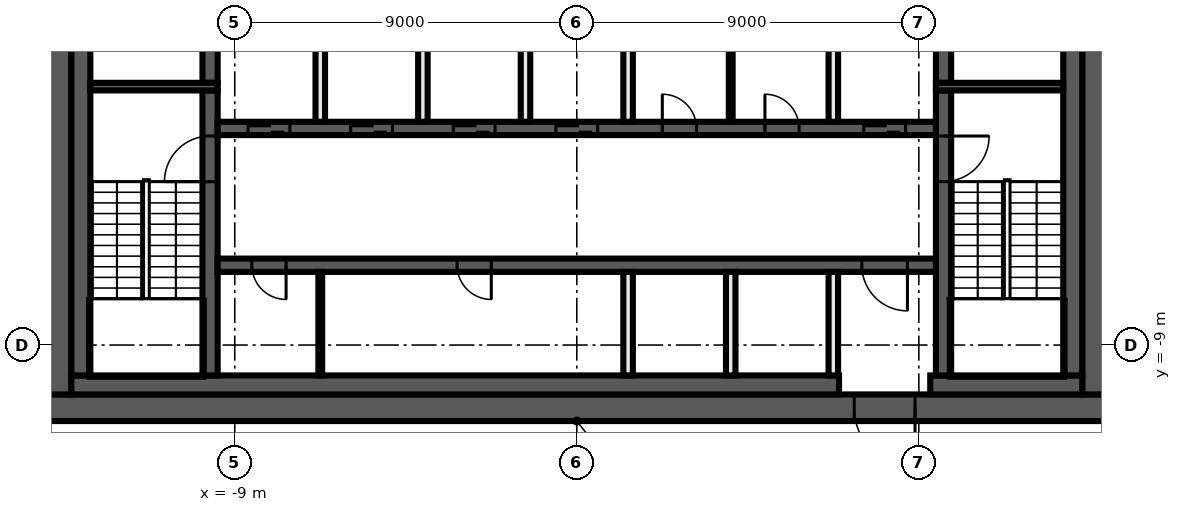
"""IFC4 building model, lengths in metres.
Left out: names, types, materials, properties, quantities, classifications, styles, units other than length and angle.
Written with IfcOpenShell. Run it as: python <this file> out.ifc"""

import sys

from ifc_helpers import new_model, si_unit, direction, frame, frame_2d, origin, place, context, subcontext, project, spatial, rectangle, extrude, element, fill, save


model = new_model("IFC4")
c1 = context("Model", 3, precision=1e-05, world=origin(), true_north=direction((0.0, 1.0)))
c2 = subcontext(c1, "Body", "Model", "MODEL_VIEW")
j1 = project(units=[si_unit("LENGTHUNIT", "METRE"), si_unit("PLANEANGLEUNIT", "RADIAN")], contexts=[c1])
p1 = place(None, origin())
s1 = spatial("IfcSite", under=j1, at=p1, CompositionType="ELEMENT")
p2 = place(p1, origin())
s2 = spatial("IfcBuilding", under=s1, at=p2, CompositionType="ELEMENT")
p3 = place(p2, frame((0.0, 0.0, 258.0)))
s3 = spatial("IfcBuildingStorey", under=s2, at=p3, CompositionType="ELEMENT", Elevation=258.0)
p4 = place(p3, frame((14.0, -10.65, 0.0), z_axis=(0.0, 0.0, 1.0), x_axis=(-1.0, 0.0, 0.0)))
e1 = element("IfcWall", 1, at=p4, inside=s3, PredefinedType="SHEAR", context=c2, shape_type="SweptSolid", body=[
    extrude(rectangle(XDim=28.0, YDim=0.7, at=frame_2d((14.0, 0.0))), origin(), (0.0, 0.0, 1.0), 3.82),
])
p5 = place(p4, frame((5.1, 0.0, 0.0)))
e2 = element("IfcOpeningElement", 2, at=p5, cuts=e1, PredefinedType="OPENING", context=c2, shape_type="SweptSolid", body=[
    extrude(rectangle(XDim=1.6, YDim=2.1, at=frame_2d((0.8, 1.05))), frame((0.0, 0.36, 0.0), z_axis=(0.0, -1.0, 0.0), x_axis=(1.0, 0.0, 0.0)), (0.0, 0.0, 1.0), 0.72),
])
for number, where, z_axis, x_axis in (
    (3, (13.65, 10.3, 0.0), (0.0, 0.0, 1.0), (0.0, -1.0, 0.0)),
    (4, (-13.65, -10.3, 0.0), (0.0, 0.0, 1.0), (0.0, 1.0, 0.0)),
):
    element("IfcWall", number, at=place(p3, frame(where, z_axis=z_axis, x_axis=x_axis)), inside=s3, PredefinedType="SHEAR", context=c2, shape_type="SweptSolid", body=[
        extrude(rectangle(XDim=20.6, YDim=0.7, at=frame_2d((10.3, 0.0))), origin(), (0.0, 0.0, 1.0), 3.82),
    ])
p6 = place(p3, frame((13.3, -10.05, 0.0), z_axis=(0.0, 0.0, 1.0), x_axis=(-1.0, 0.0, 0.0)))
e5 = element("IfcWall", 5, at=p6, inside=s3, PredefinedType="SHEAR", context=c2, shape_type="SweptSolid", body=[
    extrude(rectangle(XDim=4.0, YDim=0.5, at=frame_2d((2.0, 0.0))), origin(), (0.0, 0.0, 1.0), 3.82),
])
p7 = place(p3, frame((6.9, -10.05, 0.0), z_axis=(0.0, 0.0, 1.0), x_axis=(-1.0, 0.0, 0.0)))
e6 = element("IfcWall", 6, at=p7, inside=s3, PredefinedType="SHEAR", context=c2, shape_type="SweptSolid", body=[
    extrude(rectangle(XDim=20.2, YDim=0.5, at=frame_2d((10.1, 0.0))), origin(), (0.0, 0.0, 1.0), 3.82),
])
for number, where, z_axis, x_axis in (
    (7, (13.05, 9.8, 0.0), (0.0, 0.0, 1.0), (0.0, -1.0, 0.0)),
    (8, (-13.05, -9.8, 0.0), (0.0, 0.0, 1.0), (0.0, 1.0, 0.0)),
):
    element("IfcWall", number, at=place(p3, frame(where, z_axis=z_axis, x_axis=x_axis)), inside=s3, PredefinedType="SHEAR", context=c2, shape_type="SweptSolid", body=[
        extrude(rectangle(XDim=19.6, YDim=0.5, at=frame_2d((9.8, 0.0))), origin(), (0.0, 0.0, 1.0), 3.82),
    ])
p8 = place(p3, frame((9.65, -2.3, 0.0), z_axis=(0.0, 0.0, 1.0), x_axis=(0.0, -1.0, 0.0)))
e9 = element("IfcWall", 9, at=p8, inside=s3, PredefinedType="SHEAR", context=c2, shape_type="SweptSolid", body=[
    extrude(rectangle(XDim=7.5, YDim=0.4, at=frame_2d((3.75, 0.0))), origin(), (0.0, 0.0, 1.0), 3.82),
])
p9 = place(p8, frame((1.2, 0.0, 0.0)))
e10 = element("IfcOpeningElement", 10, at=p9, cuts=e9, PredefinedType="OPENING", context=c2, shape_type="SweptSolid", body=[
    extrude(rectangle(XDim=1.2, YDim=2.1, at=frame_2d((0.6, 1.05))), frame((0.0, 0.21, 0.0), z_axis=(0.0, -1.0, 0.0), x_axis=(1.0, 0.0, 0.0)), (0.0, 0.0, 1.0), 0.42),
])
p10 = place(p3, frame((9.65, 2.1, 0.0), z_axis=(0.0, 0.0, 1.0), x_axis=(0.0, -1.0, 0.0)))
e11 = element("IfcWall", 11, at=p10, inside=s3, PredefinedType="SHEAR", context=c2, shape_type="SweptSolid", body=[
    extrude(rectangle(XDim=4.2, YDim=0.4, at=frame_2d((2.1, 0.0))), origin(), (0.0, 0.0, 1.0), 3.82),
])
p11 = place(p10, frame((0.15, 0.0, 0.0)))
e12 = element("IfcOpeningElement", 12, at=p11, cuts=e11, PredefinedType="OPENING", context=c2, shape_type="SweptSolid", body=[
    extrude(rectangle(XDim=0.9, YDim=2.1, at=frame_2d((0.45, 1.05))), frame((0.0, 0.21, 0.0), z_axis=(0.0, -1.0, 0.0), x_axis=(1.0, 0.0, 0.0)), (0.0, 0.0, 1.0), 0.42),
])
p12 = place(p3, frame((-9.65, -9.8, 0.0), z_axis=(0.0, 0.0, 1.0), x_axis=(0.0, 1.0, 0.0)))
e13 = element("IfcWall", 13, at=p12, inside=s3, PredefinedType="SHEAR", context=c2, shape_type="SweptSolid", body=[
    extrude(rectangle(XDim=7.5, YDim=0.4, at=frame_2d((3.75, 0.0))), origin(), (0.0, 0.0, 1.0), 3.82),
])
p13 = place(p12, frame((5.1, 0.0, 0.0)))
e14 = element("IfcOpeningElement", 14, at=p13, cuts=e13, PredefinedType="OPENING", context=c2, shape_type="SweptSolid", body=[
    extrude(rectangle(XDim=1.2, YDim=2.1, at=frame_2d((0.6, 1.05))), frame((0.0, 0.21, 0.0), z_axis=(0.0, -1.0, 0.0), x_axis=(1.0, 0.0, 0.0)), (0.0, 0.0, 1.0), 0.42),
])
p14 = place(p3, frame((-9.65, -2.1, 0.0), z_axis=(0.0, 0.0, 1.0), x_axis=(0.0, 1.0, 0.0)))
e15 = element("IfcWall", 15, at=p14, inside=s3, PredefinedType="SHEAR", context=c2, shape_type="SweptSolid", body=[
    extrude(rectangle(XDim=4.2, YDim=0.4, at=frame_2d((2.1, 0.0))), origin(), (0.0, 0.0, 1.0), 3.82),
])
for number, where, z_axis, x_axis in (
    (16, (9.45, -2.2, 0.0), (0.0, 0.0, 1.0), (1.0, 0.0, 0.0)),
    (17, (-9.45, -2.2, 0.0), (0.0, 0.0, 1.0), (-1.0, 0.0, 0.0)),
):
    element("IfcWall", number, at=place(p3, frame(where, z_axis=z_axis, x_axis=x_axis)), inside=s3, PredefinedType="SHEAR", context=c2, shape_type="SweptSolid", body=[
        extrude(rectangle(XDim=3.35, YDim=0.2, at=frame_2d((1.675, 0.0))), origin(), (0.0, 0.0, 1.0), 3.82),
    ])
p15 = place(p3, frame((-9.45, -3.3, 0.0), z_axis=(0.0, 0.0, 1.0), x_axis=(1.0, 0.0, 0.0)))
e18 = element("IfcWall", 18, at=p15, inside=s3, PredefinedType="SHEAR", context=c2, shape_type="SweptSolid", body=[
    extrude(rectangle(XDim=18.9, YDim=0.35, at=frame_2d((9.45, 0.0))), origin(), (0.0, 0.0, 1.0), 3.82),
])
p16 = place(p15, frame((0.8, 0.0, 0.0)))
e19 = element("IfcOpeningElement", 19, at=p16, cuts=e18, PredefinedType="OPENING", context=c2, shape_type="SweptSolid", body=[
    extrude(rectangle(XDim=1.1, YDim=2.1, at=frame_2d((0.55, 1.05))), frame((0.0, 0.185, 0.0), z_axis=(0.0, -1.0, 0.0), x_axis=(1.0, 0.0, 0.0)), (0.0, 0.0, 1.0), 0.37),
])
p17 = place(p15, frame((3.5, 0.0, 0.0)))
e20 = element("IfcOpeningElement", 20, at=p17, cuts=e18, PredefinedType="OPENING", context=c2, shape_type="SweptSolid", body=[
    extrude(rectangle(XDim=1.1, YDim=2.1, at=frame_2d((0.55, 1.05))), frame((0.0, 0.185, 0.0), z_axis=(0.0, -1.0, 0.0), x_axis=(1.0, 0.0, 0.0)), (0.0, 0.0, 1.0), 0.37),
])
p18 = place(p15, frame((6.2, 0.0, 0.0)))
e21 = element("IfcOpeningElement", 21, at=p18, cuts=e18, PredefinedType="OPENING", context=c2, shape_type="SweptSolid", body=[
    extrude(rectangle(XDim=1.1, YDim=2.1, at=frame_2d((0.55, 1.05))), frame((0.0, 0.185, 0.0), z_axis=(0.0, -1.0, 0.0), x_axis=(1.0, 0.0, 0.0)), (0.0, 0.0, 1.0), 0.37),
])
p19 = place(p15, frame((8.9, 0.0, 0.0)))
e22 = element("IfcOpeningElement", 22, at=p19, cuts=e18, PredefinedType="OPENING", context=c2, shape_type="SweptSolid", body=[
    extrude(rectangle(XDim=1.1, YDim=2.1, at=frame_2d((0.55, 1.05))), frame((0.0, 0.185, 0.0), z_axis=(0.0, -1.0, 0.0), x_axis=(1.0, 0.0, 0.0)), (0.0, 0.0, 1.0), 0.37),
])
p20 = place(p15, frame((17.0, 0.0, 0.0)))
e23 = element("IfcOpeningElement", 23, at=p20, cuts=e18, PredefinedType="OPENING", context=c2, shape_type="SweptSolid", body=[
    extrude(rectangle(XDim=1.1, YDim=2.1, at=frame_2d((0.55, 1.05))), frame((0.0, 0.185, 0.0), z_axis=(0.0, -1.0, 0.0), x_axis=(1.0, 0.0, 0.0)), (0.0, 0.0, 1.0), 0.37),
])
p21 = place(p15, frame((11.7, 0.0, 0.0)))
e24 = element("IfcOpeningElement", 24, at=p21, cuts=e18, PredefinedType="OPENING", context=c2, shape_type="SweptSolid", body=[
    extrude(rectangle(XDim=0.9, YDim=2.1, at=frame_2d((0.45, 1.05))), frame((0.0, 0.185, 0.0), z_axis=(0.0, -1.0, 0.0), x_axis=(1.0, 0.0, 0.0)), (0.0, 0.0, 1.0), 0.37),
])
p22 = place(p15, frame((14.4, 0.0, 0.0)))
e25 = element("IfcOpeningElement", 25, at=p22, cuts=e18, PredefinedType="OPENING", context=c2, shape_type="SweptSolid", body=[
    extrude(rectangle(XDim=0.9, YDim=2.1, at=frame_2d((0.45, 1.05))), frame((0.0, 0.185, 0.0), z_axis=(0.0, -1.0, 0.0), x_axis=(1.0, 0.0, 0.0)), (0.0, 0.0, 1.0), 0.37),
])
p23 = place(p3, frame((9.45, -6.9, 0.0), z_axis=(0.0, 0.0, 1.0), x_axis=(-1.0, 0.0, 0.0)))
e26 = element("IfcWall", 26, at=p23, inside=s3, PredefinedType="SHEAR", context=c2, shape_type="SweptSolid", body=[
    extrude(rectangle(XDim=18.9, YDim=0.35, at=frame_2d((9.45, 0.0))), origin(), (0.0, 0.0, 1.0), 3.82),
])
p24 = place(p23, frame((0.75, 0.0, 0.0)))
e27 = element("IfcOpeningElement", 27, at=p24, cuts=e26, PredefinedType="OPENING", context=c2, shape_type="SweptSolid", body=[
    extrude(rectangle(XDim=1.2, YDim=2.1, at=frame_2d((0.6, 1.05))), frame((0.0, 0.185, 0.0), z_axis=(0.0, -1.0, 0.0), x_axis=(1.0, 0.0, 0.0)), (0.0, 0.0, 1.0), 0.37),
])
p25 = place(p23, frame((17.1, 0.0, 0.0)))
e28 = element("IfcOpeningElement", 28, at=p25, cuts=e26, PredefinedType="OPENING", context=c2, shape_type="SweptSolid", body=[
    extrude(rectangle(XDim=0.9, YDim=2.1, at=frame_2d((0.45, 1.05))), frame((0.0, 0.185, 0.0), z_axis=(0.0, -1.0, 0.0), x_axis=(1.0, 0.0, 0.0)), (0.0, 0.0, 1.0), 0.37),
])
p26 = place(p23, frame((11.7, 0.0, 0.0)))
e29 = element("IfcOpeningElement", 29, at=p26, cuts=e26, PredefinedType="OPENING", context=c2, shape_type="SweptSolid", body=[
    extrude(rectangle(XDim=0.9, YDim=2.1, at=frame_2d((0.45, 1.05))), frame((0.0, 0.185, 0.0), z_axis=(0.0, -1.0, 0.0), x_axis=(1.0, 0.0, 0.0)), (0.0, 0.0, 1.0), 0.37),
])
for number, where, z_axis, x_axis in (
    (30, (6.75, -9.8, 0.0), (0.0, 0.0, 1.0), (0.0, 1.0, 0.0)),
    (31, (6.75, -3.125, 0.0), (0.0, 0.0, 1.0), (0.0, 1.0, 0.0)),
):
    element("IfcWall", number, at=place(p3, frame(where, z_axis=z_axis, x_axis=x_axis)), inside=s3, PredefinedType="SOLIDWALL", context=c2, shape_type="SweptSolid", body=[
        extrude(rectangle(XDim=2.725, YDim=0.25, at=frame_2d((1.363, 0.0))), origin(), (0.0, 0.0, 1.0), 3.82),
    ])
p27 = place(p3, frame((4.05, -3.125, 0.0), z_axis=(0.0, 0.0, 1.0), x_axis=(0.0, 1.0, 0.0)))
e32 = element("IfcWall", 32, at=p27, inside=s3, PredefinedType="PARTITIONING", context=c2, shape_type="SweptSolid", body=[
    extrude(rectangle(XDim=2.725, YDim=0.1, at=frame_2d((1.363, 0.0))), origin(), (0.0, 0.0, 1.0), 3.82),
])
for number, where, z_axis, x_axis in (
    (33, (4.05, -9.8, 0.0), (0.0, 0.0, 1.0), (0.0, 1.0, 0.0)),
    (34, (1.35, -9.8, 0.0), (0.0, 0.0, 1.0), (0.0, 1.0, 0.0)),
    (35, (1.35, -3.125, 0.0), (0.0, 0.0, 1.0), (0.0, 1.0, 0.0)),
    (36, (-1.35, -3.125, 0.0), (0.0, 0.0, 1.0), (0.0, 1.0, 0.0)),
    (37, (-4.05, -3.125, 0.0), (0.0, 0.0, 1.0), (0.0, 1.0, 0.0)),
):
    element("IfcWall", number, at=place(p3, frame(where, z_axis=z_axis, x_axis=x_axis)), inside=s3, PredefinedType="SOLIDWALL", context=c2, shape_type="SweptSolid", body=[
        extrude(rectangle(XDim=2.725, YDim=0.25, at=frame_2d((1.363, 0.0))), origin(), (0.0, 0.0, 1.0), 3.82),
    ])
p28 = place(p3, frame((-6.75, -9.8, 0.0), z_axis=(0.0, 0.0, 1.0), x_axis=(0.0, 1.0, 0.0)))
e38 = element("IfcWall", 38, at=p28, inside=s3, PredefinedType="PARTITIONING", context=c2, shape_type="SweptSolid", body=[
    extrude(rectangle(XDim=2.725, YDim=0.1, at=frame_2d((1.363, 0.0))), origin(), (0.0, 0.0, 1.0), 3.82),
])
p29 = place(p3, frame((-6.75, -3.125, 0.0), z_axis=(0.0, 0.0, 1.0), x_axis=(0.0, 1.0, 0.0)))
e39 = element("IfcWall", 39, at=p29, inside=s3, PredefinedType="SOLIDWALL", context=c2, shape_type="SweptSolid", body=[
    extrude(rectangle(XDim=2.725, YDim=0.25, at=frame_2d((1.363, 0.0))), origin(), (0.0, 0.0, 1.0), 3.82),
])
p30 = place(p16, origin())
e40 = element("IfcDoor", 40, at=p30, inside=s3, OperationType="DOUBLE_DOOR_SLIDING", PredefinedType="DOOR", context=c2, shape_type="SweptSolid", body=[
    extrude(rectangle(XDim=1.1, YDim=2.1, at=frame_2d((0.55, 1.05))), frame((0.0, 0.025, 0.0), z_axis=(0.0, -1.0, 0.0), x_axis=(1.0, 0.0, 0.0)), (0.0, 0.0, 1.0), 0.05),
])
fill(e19, e40)
p31 = place(p17, origin())
e41 = element("IfcDoor", 41, at=p31, inside=s3, OperationType="DOUBLE_DOOR_SLIDING", PredefinedType="DOOR", context=c2, shape_type="SweptSolid", body=[
    extrude(rectangle(XDim=1.1, YDim=2.1, at=frame_2d((0.55, 1.05))), frame((0.0, 0.025, 0.0), z_axis=(0.0, -1.0, 0.0), x_axis=(1.0, 0.0, 0.0)), (0.0, 0.0, 1.0), 0.05),
])
fill(e20, e41)
p32 = place(p18, origin())
e42 = element("IfcDoor", 42, at=p32, inside=s3, OperationType="DOUBLE_DOOR_SLIDING", PredefinedType="DOOR", context=c2, shape_type="SweptSolid", body=[
    extrude(rectangle(XDim=1.1, YDim=2.1, at=frame_2d((0.55, 1.05))), frame((0.0, 0.025, 0.0), z_axis=(0.0, -1.0, 0.0), x_axis=(1.0, 0.0, 0.0)), (0.0, 0.0, 1.0), 0.05),
])
fill(e21, e42)
p33 = place(p19, origin())
e43 = element("IfcDoor", 43, at=p33, inside=s3, OperationType="DOUBLE_DOOR_SLIDING", PredefinedType="DOOR", context=c2, shape_type="SweptSolid", body=[
    extrude(rectangle(XDim=1.1, YDim=2.1, at=frame_2d((0.55, 1.05))), frame((0.0, 0.025, 0.0), z_axis=(0.0, -1.0, 0.0), x_axis=(1.0, 0.0, 0.0)), (0.0, 0.0, 1.0), 0.05),
])
fill(e22, e43)
p34 = place(p20, origin())
e44 = element("IfcDoor", 44, at=p34, inside=s3, OperationType="DOUBLE_DOOR_SLIDING", PredefinedType="DOOR", context=c2, shape_type="SweptSolid", body=[
    extrude(rectangle(XDim=1.1, YDim=2.1, at=frame_2d((0.55, 1.05))), frame((0.0, 0.025, 0.0), z_axis=(0.0, -1.0, 0.0), x_axis=(1.0, 0.0, 0.0)), (0.0, 0.0, 1.0), 0.05),
])
fill(e23, e44)
p35 = place(p5, origin())
e45 = element("IfcDoor", 45, at=p35, inside=s3, OperationType="DOUBLE_DOOR_SINGLE_SWING", PredefinedType="DOOR", context=c2, shape_type="SweptSolid", body=[
    extrude(rectangle(XDim=1.6, YDim=2.1, at=frame_2d((0.8, 1.05))), frame((0.0, 0.025, 0.0), z_axis=(0.0, -1.0, 0.0), x_axis=(1.0, 0.0, 0.0)), (0.0, 0.0, 1.0), 0.05),
])
fill(e2, e45)
p36 = place(p24, origin())
e46 = element("IfcDoor", 46, at=p36, inside=s3, OperationType="SINGLE_SWING_LEFT", PredefinedType="DOOR", context=c2, shape_type="SweptSolid", body=[
    extrude(rectangle(XDim=1.2, YDim=2.1, at=frame_2d((0.6, 1.05))), frame((0.0, 0.025, 0.0), z_axis=(0.0, -1.0, 0.0), x_axis=(1.0, 0.0, 0.0)), (0.0, 0.0, 1.0), 0.05),
])
fill(e27, e46)
p37 = place(p21, origin())
e47 = element("IfcDoor", 47, at=p37, inside=s3, OperationType="SINGLE_SWING_RIGHT", PredefinedType="DOOR", context=c2, shape_type="SweptSolid", body=[
    extrude(rectangle(XDim=0.9, YDim=2.1, at=frame_2d((0.45, 1.05))), frame((0.0, 0.025, 0.0), z_axis=(0.0, -1.0, 0.0), x_axis=(1.0, 0.0, 0.0)), (0.0, 0.0, 1.0), 0.05),
])
fill(e24, e47)
p38 = place(p22, origin())
e48 = element("IfcDoor", 48, at=p38, inside=s3, OperationType="SINGLE_SWING_LEFT", PredefinedType="DOOR", context=c2, shape_type="SweptSolid", body=[
    extrude(rectangle(XDim=0.9, YDim=2.1, at=frame_2d((0.45, 1.05))), frame((0.0, 0.025, 0.0), z_axis=(0.0, -1.0, 0.0), x_axis=(1.0, 0.0, 0.0)), (0.0, 0.0, 1.0), 0.05),
])
fill(e25, e48)
p39 = place(p25, origin())
e49 = element("IfcDoor", 49, at=p39, inside=s3, OperationType="SINGLE_SWING_RIGHT", PredefinedType="DOOR", context=c2, shape_type="SweptSolid", body=[
    extrude(rectangle(XDim=0.9, YDim=2.1, at=frame_2d((0.45, 1.05))), frame((0.0, 0.025, 0.0), z_axis=(0.0, -1.0, 0.0), x_axis=(1.0, 0.0, 0.0)), (0.0, 0.0, 1.0), 0.05),
])
fill(e28, e49)
p40 = place(p26, origin())
e50 = element("IfcDoor", 50, at=p40, inside=s3, OperationType="SINGLE_SWING_LEFT", PredefinedType="DOOR", context=c2, shape_type="SweptSolid", body=[
    extrude(rectangle(XDim=0.9, YDim=2.1, at=frame_2d((0.45, 1.05))), frame((0.0, 0.025, 0.0), z_axis=(0.0, -1.0, 0.0), x_axis=(1.0, 0.0, 0.0)), (0.0, 0.0, 1.0), 0.05),
])
fill(e29, e50)
p41 = place(p9, origin())
e51 = element("IfcDoor", 51, at=p41, inside=s3, OperationType="SINGLE_SWING_RIGHT", PredefinedType="DOOR", context=c2, shape_type="SweptSolid", body=[
    extrude(rectangle(XDim=1.2, YDim=2.1, at=frame_2d((0.6, 1.05))), frame((0.0, 0.025, 0.0), z_axis=(0.0, -1.0, 0.0), x_axis=(1.0, 0.0, 0.0)), (0.0, 0.0, 1.0), 0.05),
])
fill(e10, e51)
p42 = place(p13, origin())
e52 = element("IfcDoor", 52, at=p42, inside=s3, OperationType="SINGLE_SWING_LEFT", PredefinedType="DOOR", context=c2, shape_type="SweptSolid", body=[
    extrude(rectangle(XDim=1.2, YDim=2.1, at=frame_2d((0.6, 1.05))), frame((0.0, 0.025, 0.0), z_axis=(0.0, -1.0, 0.0), x_axis=(1.0, 0.0, 0.0)), (0.0, 0.0, 1.0), 0.05),
])
fill(e14, e52)
save(model, sys.argv[1])
